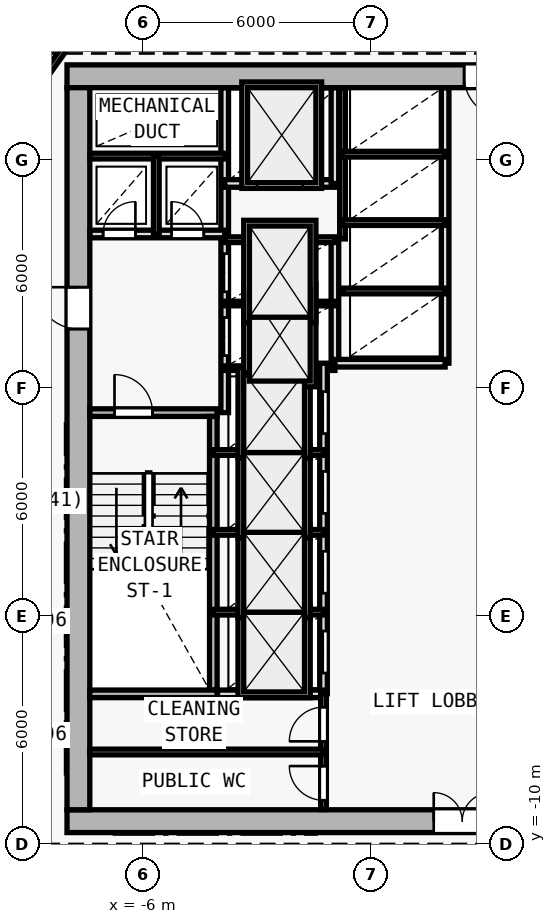
"""IFC4 building model, lengths in metres.
Left out: names, types, materials, properties, quantities, classifications, styles, units other than length and angle.
Written with IfcOpenShell. Run it as: python <this file> out.ifc"""

import sys

from ifc_helpers import new_model, si_unit, direction, frame, frame_2d, origin, origin_2d, place, context, subcontext, project, spatial, rectangle, i_section, extrude, element, fill, save


model = new_model("IFC4")
c1 = context("Model", 3, precision=1e-05, world=origin(), true_north=direction((0.0, 1.0)))
c2 = subcontext(c1, "Body", "Model", "MODEL_VIEW")
j1 = project(units=[si_unit("LENGTHUNIT", "METRE"), si_unit("PLANEANGLEUNIT", "RADIAN")], contexts=[c1])
p1 = place(None, origin())
s1 = spatial("IfcSite", under=j1, at=p1, CompositionType="ELEMENT")
p2 = place(p1, origin())
s2 = spatial("IfcBuilding", under=s1, at=p2, CompositionType="ELEMENT")
p3 = place(p2, frame((0.0, 0.0, 86.1)))
s3 = spatial("IfcBuildingStorey", under=s2, at=p3, CompositionType="ELEMENT", Elevation=86.1)
for number, where, z_axis, x_axis in (
    (1, (-7.7, -9.4, 0.0), (0.0, 0.0, 1.0), (1.0, 0.0, 0.0)),
    (2, (-7.7, 10.2, 0.0), (0.0, 0.0, 1.0), (1.0, 0.0, 0.0)),
    (3, (0.0, -9.4, 0.0), (0.0, 0.0, 1.0), (1.0, 0.0, 0.0)),
    (4, (-7.7, 2.0, 0.0), (0.0, 0.0, 1.0), (1.0, 0.0, 0.0)),
):
    element("IfcColumn", number, at=place(p3, frame(where, z_axis=z_axis, x_axis=x_axis)), inside=s3, PredefinedType="COLUMN", context=c2, shape_type="SweptSolid", body=[
        extrude(i_section(OverallWidth=0.409, OverallDepth=0.425, WebThickness=0.021, FlangeThickness=0.034, FilletRadius=0.015, at=origin_2d()), origin(), (0.0, 0.0, 1.0), 3.6),
    ])
p4 = place(p3, frame((-8.0, -9.4, 0.0), z_axis=(0.0, 0.0, 1.0), x_axis=(1.0, 0.0, 0.0)))
e5 = element("IfcWall", 5, at=p4, inside=s3, PredefinedType="SHEAR", context=c2, shape_type="SweptSolid", body=[
    extrude(rectangle(XDim=16.0, YDim=0.6, at=frame_2d((8.0, 0.0))), origin(), (0.0, 0.0, 1.0), 3.35),
])
p5 = place(p4, frame((9.65, 0.0, 0.0)))
e6 = element("IfcOpeningElement", 6, at=p5, cuts=e5, PredefinedType="OPENING", context=c2, shape_type="SweptSolid", body=[
    extrude(rectangle(XDim=1.5, YDim=2.2, at=frame_2d((0.75, 1.1))), frame((0.0, 0.31, 0.0), z_axis=(0.0, -1.0, 0.0), x_axis=(1.0, 0.0, 0.0)), (0.0, 0.0, 1.0), 0.62),
])
p6 = place(p3, frame((8.0, 10.2, 0.0), z_axis=(0.0, 0.0, 1.0), x_axis=(-1.0, 0.0, 0.0)))
e7 = element("IfcWall", 7, at=p6, inside=s3, PredefinedType="SHEAR", context=c2, shape_type="SweptSolid", body=[
    extrude(rectangle(XDim=16.0, YDim=0.6, at=frame_2d((8.0, 0.0))), origin(), (0.0, 0.0, 1.0), 3.35),
])
p7 = place(p6, frame((4.45, 0.0, 0.0)))
e8 = element("IfcOpeningElement", 8, at=p7, cuts=e7, PredefinedType="OPENING", context=c2, shape_type="SweptSolid", body=[
    extrude(rectangle(XDim=1.1, YDim=2.15, at=frame_2d((0.55, 1.075))), frame((0.0, 0.31, 0.0), z_axis=(0.0, -1.0, 0.0), x_axis=(1.0, 0.0, 0.0)), (0.0, 0.0, 1.0), 0.62),
])
p8 = place(p3, frame((-7.7, -9.1, 0.0), z_axis=(0.0, 0.0, 1.0), x_axis=(0.0, 1.0, 0.0)))
e9 = element("IfcWall", 9, at=p8, inside=s3, PredefinedType="SHEAR", context=c2, shape_type="SweptSolid", body=[
    extrude(rectangle(XDim=19.0, YDim=0.6, at=frame_2d((9.5, 0.0))), origin(), (0.0, 0.0, 1.0), 3.35),
])
p9 = place(p8, frame((12.65, 0.0, 0.0)))
e10 = element("IfcOpeningElement", 10, at=p9, cuts=e9, PredefinedType="OPENING", context=c2, shape_type="SweptSolid", body=[
    extrude(rectangle(XDim=1.1, YDim=2.15, at=frame_2d((0.55, 1.075))), frame((0.0, 0.31, 0.0), z_axis=(0.0, -1.0, 0.0), x_axis=(1.0, 0.0, 0.0)), (0.0, 0.0, 1.0), 0.62),
])
p10 = place(p3, frame((-7.4, 1.35, 0.0), z_axis=(0.0, 0.0, 1.0), x_axis=(1.0, 0.0, 0.0)))
e11 = element("IfcWall", 11, at=p10, inside=s3, PredefinedType="SOLIDWALL", context=c2, shape_type="SweptSolid", body=[
    extrude(rectangle(XDim=3.35, YDim=0.2, at=frame_2d((1.675, 0.0))), origin(), (0.0, 0.0, 1.0), 3.35),
])
p11 = place(p10, frame((0.65, 0.0, 0.0)))
e12 = element("IfcOpeningElement", 12, at=p11, cuts=e11, PredefinedType="OPENING", context=c2, shape_type="SweptSolid", body=[
    extrude(rectangle(XDim=1.0, YDim=2.15, at=frame_2d((0.5, 1.075))), frame((0.0, 0.11, 0.0), z_axis=(0.0, -1.0, 0.0), x_axis=(1.0, 0.0, 0.0)), (0.0, 0.0, 1.0), 0.22),
])
p12 = place(p3, frame((-4.15, -5.95, 0.0), z_axis=(0.0, 0.0, 1.0), x_axis=(0.0, 1.0, 0.0)))
e13 = element("IfcWall", 13, at=p12, inside=s3, PredefinedType="SOLIDWALL", context=c2, shape_type="SweptSolid", body=[
    extrude(rectangle(XDim=7.2, YDim=0.2, at=frame_2d((3.6, 0.0))), origin(), (0.0, 0.0, 1.0), 3.35),
])
p13 = place(p3, frame((-3.85, 1.35, 0.0), z_axis=(0.0, 0.0, 1.0), x_axis=(0.0, 1.0, 0.0)))
e14 = element("IfcWall", 14, at=p13, inside=s3, PredefinedType="SOLIDWALL", context=c2, shape_type="SweptSolid", body=[
    extrude(rectangle(XDim=8.545, YDim=0.2, at=frame_2d((4.272, 0.0))), origin(), (0.0, 0.0, 1.0), 3.35),
])
p14 = place(p13, frame((1.5, 0.0, 0.0)))
e15 = element("IfcOpeningElement", 15, at=p14, cuts=e14, PredefinedType="OPENING", context=c2, shape_type="SweptSolid", body=[
    extrude(rectangle(XDim=1.0, YDim=2.15, at=frame_2d((0.5, 1.075))), frame((0.0, 0.11, 0.0), z_axis=(0.0, -1.0, 0.0), x_axis=(1.0, 0.0, 0.0)), (0.0, 0.0, 1.0), 0.22),
])
p15 = place(p13, frame((3.18, 0.0, 0.0)))
e16 = element("IfcOpeningElement", 16, at=p15, cuts=e14, PredefinedType="OPENING", context=c2, shape_type="SweptSolid", body=[
    extrude(rectangle(XDim=1.0, YDim=2.15, at=frame_2d((0.5, 1.075))), frame((0.0, 0.11, 0.0), z_axis=(0.0, -1.0, 0.0), x_axis=(1.0, 0.0, 0.0)), (0.0, 0.0, 1.0), 0.22),
])
p16 = place(p3, frame((-7.395, 6.05, 0.0), z_axis=(0.0, 0.0, 1.0), x_axis=(1.0, 0.0, 0.0)))
e17 = element("IfcWall", 17, at=p16, inside=s3, PredefinedType="SOLIDWALL", context=c2, shape_type="SweptSolid", body=[
    extrude(rectangle(XDim=3.545, YDim=0.2, at=frame_2d((1.772, 0.0))), origin(), (0.0, 0.0, 1.0), 3.35),
])
p17 = place(p16, frame((0.345, 0.0, 0.0)))
e18 = element("IfcOpeningElement", 18, at=p17, cuts=e17, PredefinedType="OPENING", context=c2, shape_type="SweptSolid", body=[
    extrude(rectangle(XDim=0.85, YDim=2.1, at=frame_2d((0.425, 1.05))), frame((0.0, 0.11, 0.0), z_axis=(0.0, -1.0, 0.0), x_axis=(1.0, 0.0, 0.0)), (0.0, 0.0, 1.0), 0.22),
])
p18 = place(p16, frame((2.145, 0.0, 0.0)))
e19 = element("IfcOpeningElement", 19, at=p18, cuts=e17, PredefinedType="OPENING", context=c2, shape_type="SweptSolid", body=[
    extrude(rectangle(XDim=0.85, YDim=2.1, at=frame_2d((0.425, 1.05))), frame((0.0, 0.11, 0.0), z_axis=(0.0, -1.0, 0.0), x_axis=(1.0, 0.0, 0.0)), (0.0, 0.0, 1.0), 0.22),
])
p19 = place(p3, frame((-7.395, 8.1, 0.0), z_axis=(0.0, 0.0, 1.0), x_axis=(1.0, 0.0, 0.0)))
e20 = element("IfcWall", 20, at=p19, inside=s3, PredefinedType="PARTITIONING", context=c2, shape_type="SweptSolid", body=[
    extrude(rectangle(XDim=3.545, YDim=0.15, at=frame_2d((1.772, 0.0))), origin(), (0.0, 0.0, 1.0), 3.35),
])
p20 = place(p3, frame((-5.65, 6.05, 0.0), z_axis=(0.0, 0.0, 1.0), x_axis=(0.0, 1.0, 0.0)))
e21 = element("IfcWall", 21, at=p20, inside=s3, PredefinedType="PARTITIONING", context=c2, shape_type="SweptSolid", body=[
    extrude(rectangle(XDim=2.05, YDim=0.15, at=frame_2d((1.025, 0.0))), origin(), (0.0, 0.0, 1.0), 3.35),
])
p21 = place(p3, frame((-0.95, 2.65, 0.0), z_axis=(0.0, 0.0, 1.0), x_axis=(0.0, 1.0, 0.0)))
e22 = element("IfcWall", 22, at=p21, inside=s3, PredefinedType="SOLIDWALL", context=c2, shape_type="SweptSolid", body=[
    extrude(rectangle(XDim=3.27, YDim=0.2, at=frame_2d((1.635, 0.0))), origin(), (0.0, 0.0, 1.0), 3.35),
])
for number, where, z_axis, x_axis in (
    (23, (-3.85, 2.52, 0.0), (0.0, 0.0, 1.0), (1.0, 0.0, 0.0)),
    (24, (-3.85, 4.22, 0.0), (0.0, 0.0, 1.0), (1.0, 0.0, 0.0)),
):
    element("IfcWall", number, at=place(p3, frame(where, z_axis=z_axis, x_axis=x_axis)), inside=s3, PredefinedType="PARTITIONING", context=c2, shape_type="SweptSolid", body=[
        extrude(rectangle(XDim=2.9, YDim=0.12, at=frame_2d((1.45, 0.0))), origin(), (0.0, 0.0, 1.0), 3.35),
    ])
p22 = place(p3, frame((-3.85, 5.9, 0.0), z_axis=(0.0, 0.0, 1.0), x_axis=(1.0, 0.0, 0.0)))
e25 = element("IfcWall", 25, at=p22, inside=s3, PredefinedType="PARTITIONING", context=c2, shape_type="SweptSolid", body=[
    extrude(rectangle(XDim=2.9, YDim=0.15, at=frame_2d((1.45, 0.0))), origin(), (0.0, 0.0, 1.0), 3.35),
])
p23 = place(p3, frame((-3.85, 7.38, 0.0), z_axis=(0.0, 0.0, 1.0), x_axis=(1.0, 0.0, 0.0)))
e26 = element("IfcWall", 26, at=p23, inside=s3, PredefinedType="SOLIDWALL", context=c2, shape_type="SweptSolid", body=[
    extrude(rectangle(XDim=2.9, YDim=0.2, at=frame_2d((1.45, 0.0))), origin(), (0.0, 0.0, 1.0), 3.35),
])
p24 = place(p23, frame((0.85, 0.0, 0.0)))
e27 = element("IfcOpeningElement", 27, at=p24, cuts=e26, PredefinedType="OPENING", context=c2, shape_type="SweptSolid", body=[
    extrude(rectangle(XDim=1.2, YDim=2.2, at=frame_2d((0.6, 1.1))), frame((0.0, 0.11, 0.0), z_axis=(0.0, -1.0, 0.0), x_axis=(1.0, 0.0, 0.0)), (0.0, 0.0, 1.0), 0.22),
])
p25 = place(p3, frame((-0.95, 7.38, 0.0), z_axis=(0.0, 0.0, 1.0), x_axis=(0.0, 1.0, 0.0)))
e28 = element("IfcWall", 28, at=p25, inside=s3, PredefinedType="SOLIDWALL", context=c2, shape_type="SweptSolid", body=[
    extrude(rectangle(XDim=2.515, YDim=0.2, at=frame_2d((1.258, 0.0))), origin(), (0.0, 0.0, 1.0), 3.35),
])
p26 = place(p3, frame((-1.25, -6.05, 0.0), z_axis=(0.0, 0.0, 1.0), x_axis=(0.0, 1.0, 0.0)))
e29 = element("IfcWall", 29, at=p26, inside=s3, PredefinedType="SOLIDWALL", context=c2, shape_type="SweptSolid", body=[
    extrude(rectangle(XDim=8.7, YDim=0.2, at=frame_2d((4.35, 0.0))), origin(), (0.0, 0.0, 1.0), 3.35),
])
p27 = place(p26, frame((0.55, 0.0, 0.0)))
e30 = element("IfcOpeningElement", 30, at=p27, cuts=e29, PredefinedType="OPENING", context=c2, shape_type="SweptSolid", body=[
    extrude(rectangle(XDim=1.1, YDim=2.15, at=frame_2d((0.55, 1.075))), frame((0.0, 0.11, 0.0), z_axis=(0.0, -1.0, 0.0), x_axis=(1.0, 0.0, 0.0)), (0.0, 0.0, 1.0), 0.22),
])
p28 = place(p26, frame((2.65, 0.0, 0.0)))
e31 = element("IfcOpeningElement", 31, at=p28, cuts=e29, PredefinedType="OPENING", context=c2, shape_type="SweptSolid", body=[
    extrude(rectangle(XDim=1.1, YDim=2.15, at=frame_2d((0.55, 1.075))), frame((0.0, 0.11, 0.0), z_axis=(0.0, -1.0, 0.0), x_axis=(1.0, 0.0, 0.0)), (0.0, 0.0, 1.0), 0.22),
])
p29 = place(p26, frame((4.75, 0.0, 0.0)))
e32 = element("IfcOpeningElement", 32, at=p29, cuts=e29, PredefinedType="OPENING", context=c2, shape_type="SweptSolid", body=[
    extrude(rectangle(XDim=1.1, YDim=2.15, at=frame_2d((0.55, 1.075))), frame((0.0, 0.11, 0.0), z_axis=(0.0, -1.0, 0.0), x_axis=(1.0, 0.0, 0.0)), (0.0, 0.0, 1.0), 0.22),
])
p30 = place(p26, frame((6.85, 0.0, 0.0)))
e33 = element("IfcOpeningElement", 33, at=p30, cuts=e29, PredefinedType="OPENING", context=c2, shape_type="SweptSolid", body=[
    extrude(rectangle(XDim=1.1, YDim=2.15, at=frame_2d((0.55, 1.075))), frame((0.0, 0.11, 0.0), z_axis=(0.0, -1.0, 0.0), x_axis=(1.0, 0.0, 0.0)), (0.0, 0.0, 1.0), 0.22),
])
for number, where, z_axis, x_axis in (
    (34, (-4.15, -3.9, 0.0), (0.0, 0.0, 1.0), (1.0, 0.0, 0.0)),
    (35, (-4.15, -1.8, 0.0), (0.0, 0.0, 1.0), (1.0, 0.0, 0.0)),
    (36, (-4.15, 0.3, 0.0), (0.0, 0.0, 1.0), (1.0, 0.0, 0.0)),
):
    element("IfcWall", number, at=place(p3, frame(where, z_axis=z_axis, x_axis=x_axis)), inside=s3, PredefinedType="PARTITIONING", context=c2, shape_type="SweptSolid", body=[
        extrude(rectangle(XDim=2.9, YDim=0.15, at=frame_2d((1.45, 0.0))), origin(), (0.0, 0.0, 1.0), 3.35),
    ])
p31 = place(p3, frame((1.95, 2.65, 0.0), z_axis=(0.0, 0.0, 1.0), x_axis=(0.0, 1.0, 0.0)))
e37 = element("IfcWall", 37, at=p31, inside=s3, PredefinedType="SOLIDWALL", context=c2, shape_type="SweptSolid", body=[
    extrude(rectangle(XDim=7.245, YDim=0.2, at=frame_2d((3.623, 0.0))), origin(), (0.0, 0.0, 1.0), 3.35),
])
p32 = place(p3, frame((-0.95, 2.65, 0.0), z_axis=(0.0, 0.0, 1.0), x_axis=(1.0, 0.0, 0.0)))
e38 = element("IfcWall", 38, at=p32, inside=s3, PredefinedType="SOLIDWALL", context=c2, shape_type="SweptSolid", body=[
    extrude(rectangle(XDim=2.9, YDim=0.2, at=frame_2d((1.45, 0.0))), origin(), (0.0, 0.0, 1.0), 3.35),
])
p33 = place(p3, frame((-0.75, 5.92, 0.0), z_axis=(0.0, 0.0, 1.0), x_axis=(0.0, 1.0, 0.0)))
e39 = element("IfcWall", 39, at=p33, inside=s3, PredefinedType="PARTITIONING", context=c2, shape_type="SweptSolid", body=[
    extrude(rectangle(XDim=3.975, YDim=0.15, at=frame_2d((1.988, 0.0))), origin(), (0.0, 0.0, 1.0), 3.35),
])
for number, where, z_axis, x_axis in (
    (40, (-0.75, 4.55, 0.0), (0.0, 0.0, 1.0), (1.0, 0.0, 0.0)),
    (41, (-0.75, 6.35, 0.0), (0.0, 0.0, 1.0), (1.0, 0.0, 0.0)),
    (42, (-0.75, 8.15, 0.0), (0.0, 0.0, 1.0), (1.0, 0.0, 0.0)),
):
    element("IfcWall", number, at=place(p3, frame(where, z_axis=z_axis, x_axis=x_axis)), inside=s3, PredefinedType="PARTITIONING", context=c2, shape_type="SweptSolid", body=[
        extrude(rectangle(XDim=2.7, YDim=0.15, at=frame_2d((1.35, 0.0))), origin(), (0.0, 0.0, 1.0), 3.35),
    ])
p34 = place(p3, frame((-7.4, -6.05, 0.0), z_axis=(0.0, 0.0, 1.0), x_axis=(1.0, 0.0, 0.0)))
e43 = element("IfcWall", 43, at=p34, inside=s3, PredefinedType="SOLIDWALL", context=c2, shape_type="SweptSolid", body=[
    extrude(rectangle(XDim=3.35, YDim=0.2, at=frame_2d((1.675, 0.0))), origin(), (0.0, 0.0, 1.0), 3.35),
])
p35 = place(p3, frame((-4.04, -6.05, 0.0), z_axis=(0.0, 0.0, 1.0), x_axis=(1.0, 0.0, 0.0)))
e44 = element("IfcWall", 44, at=p35, inside=s3, PredefinedType="SOLIDWALL", context=c2, shape_type="SweptSolid", body=[
    extrude(rectangle(XDim=2.79, YDim=0.2, at=frame_2d((1.395, 0.0))), origin(), (0.0, 0.0, 1.0), 3.35),
])
p36 = place(p3, frame((-1.25, -9.095, 0.0), z_axis=(0.0, 0.0, 1.0), x_axis=(0.0, 1.0, 0.0)))
e45 = element("IfcWall", 45, at=p36, inside=s3, PredefinedType="PARTITIONING", context=c2, shape_type="SweptSolid", body=[
    extrude(rectangle(XDim=3.045, YDim=0.15, at=frame_2d((1.522, 0.0))), origin(), (0.0, 0.0, 1.0), 3.35),
])
p37 = place(p36, frame((1.795, 0.0, 0.0)))
e46 = element("IfcOpeningElement", 46, at=p37, cuts=e45, PredefinedType="OPENING", context=c2, shape_type="SweptSolid", body=[
    extrude(rectangle(XDim=0.9, YDim=2.1, at=frame_2d((0.45, 1.05))), frame((0.0, 0.085, 0.0), z_axis=(0.0, -1.0, 0.0), x_axis=(1.0, 0.0, 0.0)), (0.0, 0.0, 1.0), 0.17),
])
p38 = place(p36, frame((0.245, 0.0, 0.0)))
e47 = element("IfcOpeningElement", 47, at=p38, cuts=e45, PredefinedType="OPENING", context=c2, shape_type="SweptSolid", body=[
    extrude(rectangle(XDim=0.9, YDim=2.1, at=frame_2d((0.45, 1.05))), frame((0.0, 0.085, 0.0), z_axis=(0.0, -1.0, 0.0), x_axis=(1.0, 0.0, 0.0)), (0.0, 0.0, 1.0), 0.17),
])
p39 = place(p3, frame((-7.395, -7.58, 0.0), z_axis=(0.0, 0.0, 1.0), x_axis=(1.0, 0.0, 0.0)))
e48 = element("IfcWall", 48, at=p39, inside=s3, PredefinedType="PARTITIONING", context=c2, shape_type="SweptSolid", body=[
    extrude(rectangle(XDim=6.145, YDim=0.15, at=frame_2d((3.073, 0.0))), origin(), (0.0, 0.0, 1.0), 3.35),
])
p40 = place(p3, frame((-9.86, 8.426, 0.0), z_axis=(0.0, 0.0, 1.0), x_axis=(0.582449511476, 0.812866881218, 0.0)))
e49 = element("IfcWall", 49, at=p40, inside=s3, PredefinedType="PARTITIONING", context=c2, shape_type="SweptSolid", body=[
    extrude(rectangle(XDim=4.84, YDim=0.15, at=frame_2d((2.42, 0.0))), origin(), (0.0, 0.0, 1.0), 2.725),
])
p41 = place(p5, origin())
e50 = element("IfcDoor", 50, at=p41, inside=s3, OperationType="DOUBLE_DOOR_SINGLE_SWING", PredefinedType="DOOR", context=c2, shape_type="SweptSolid", body=[
    extrude(rectangle(XDim=1.5, YDim=2.2, at=frame_2d((0.75, 1.1))), frame((0.0, 0.025, 0.0), z_axis=(0.0, -1.0, 0.0), x_axis=(1.0, 0.0, 0.0)), (0.0, 0.0, 1.0), 0.05),
])
fill(e6, e50)
p42 = place(p9, origin())
e51 = element("IfcDoor", 51, at=p42, inside=s3, OperationType="SINGLE_SWING_RIGHT", PredefinedType="DOOR", context=c2, shape_type="SweptSolid", body=[
    extrude(rectangle(XDim=1.1, YDim=2.15, at=frame_2d((0.55, 1.075))), frame((0.0, 0.025, 0.0), z_axis=(0.0, -1.0, 0.0), x_axis=(1.0, 0.0, 0.0)), (0.0, 0.0, 1.0), 0.05),
])
fill(e10, e51)
p43 = place(p7, origin())
e52 = element("IfcDoor", 52, at=p43, inside=s3, OperationType="SINGLE_SWING_LEFT", PredefinedType="DOOR", context=c2, shape_type="SweptSolid", body=[
    extrude(rectangle(XDim=1.1, YDim=2.15, at=frame_2d((0.55, 1.075))), frame((0.0, 0.025, 0.0), z_axis=(0.0, -1.0, 0.0), x_axis=(1.0, 0.0, 0.0)), (0.0, 0.0, 1.0), 0.05),
])
fill(e8, e52)
p44 = place(p11, origin())
e53 = element("IfcDoor", 53, at=p44, inside=s3, OperationType="SINGLE_SWING_LEFT", PredefinedType="DOOR", context=c2, shape_type="SweptSolid", body=[
    extrude(rectangle(XDim=1.0, YDim=2.15, at=frame_2d((0.5, 1.075))), frame((0.0, 0.025, 0.0), z_axis=(0.0, -1.0, 0.0), x_axis=(1.0, 0.0, 0.0)), (0.0, 0.0, 1.0), 0.05),
])
fill(e12, e53)
p45 = place(p17, origin())
e54 = element("IfcDoor", 54, at=p45, inside=s3, OperationType="SINGLE_SWING_RIGHT", PredefinedType="DOOR", context=c2, shape_type="SweptSolid", body=[
    extrude(rectangle(XDim=0.85, YDim=2.1, at=frame_2d((0.425, 1.05))), frame((0.0, 0.025, 0.0), z_axis=(0.0, -1.0, 0.0), x_axis=(1.0, 0.0, 0.0)), (0.0, 0.0, 1.0), 0.05),
])
fill(e18, e54)
p46 = place(p18, origin())
e55 = element("IfcDoor", 55, at=p46, inside=s3, OperationType="SINGLE_SWING_LEFT", PredefinedType="DOOR", context=c2, shape_type="SweptSolid", body=[
    extrude(rectangle(XDim=0.85, YDim=2.1, at=frame_2d((0.425, 1.05))), frame((0.0, 0.025, 0.0), z_axis=(0.0, -1.0, 0.0), x_axis=(1.0, 0.0, 0.0)), (0.0, 0.0, 1.0), 0.05),
])
fill(e19, e55)
p47 = place(p24, origin())
e56 = element("IfcDoor", 56, at=p47, inside=s3, OperationType="DOUBLE_DOOR_SLIDING", PredefinedType="DOOR", context=c2, shape_type="SweptSolid", body=[
    extrude(rectangle(XDim=1.2, YDim=2.2, at=frame_2d((0.6, 1.1))), frame((0.0, 0.025, 0.0), z_axis=(0.0, -1.0, 0.0), x_axis=(1.0, 0.0, 0.0)), (0.0, 0.0, 1.0), 0.05),
])
fill(e27, e56)
p48 = place(p27, origin())
e57 = element("IfcDoor", 57, at=p48, inside=s3, OperationType="DOUBLE_DOOR_SLIDING", PredefinedType="DOOR", context=c2, shape_type="SweptSolid", body=[
    extrude(rectangle(XDim=1.1, YDim=2.15, at=frame_2d((0.55, 1.075))), frame((0.0, 0.025, 0.0), z_axis=(0.0, -1.0, 0.0), x_axis=(1.0, 0.0, 0.0)), (0.0, 0.0, 1.0), 0.05),
])
fill(e30, e57)
p49 = place(p28, origin())
e58 = element("IfcDoor", 58, at=p49, inside=s3, OperationType="DOUBLE_DOOR_SLIDING", PredefinedType="DOOR", context=c2, shape_type="SweptSolid", body=[
    extrude(rectangle(XDim=1.1, YDim=2.15, at=frame_2d((0.55, 1.075))), frame((0.0, 0.025, 0.0), z_axis=(0.0, -1.0, 0.0), x_axis=(1.0, 0.0, 0.0)), (0.0, 0.0, 1.0), 0.05),
])
fill(e31, e58)
p50 = place(p29, origin())
e59 = element("IfcDoor", 59, at=p50, inside=s3, OperationType="DOUBLE_DOOR_SLIDING", PredefinedType="DOOR", context=c2, shape_type="SweptSolid", body=[
    extrude(rectangle(XDim=1.1, YDim=2.15, at=frame_2d((0.55, 1.075))), frame((0.0, 0.025, 0.0), z_axis=(0.0, -1.0, 0.0), x_axis=(1.0, 0.0, 0.0)), (0.0, 0.0, 1.0), 0.05),
])
fill(e32, e59)
p51 = place(p30, origin())
e60 = element("IfcDoor", 60, at=p51, inside=s3, OperationType="DOUBLE_DOOR_SLIDING", PredefinedType="DOOR", context=c2, shape_type="SweptSolid", body=[
    extrude(rectangle(XDim=1.1, YDim=2.15, at=frame_2d((0.55, 1.075))), frame((0.0, 0.025, 0.0), z_axis=(0.0, -1.0, 0.0), x_axis=(1.0, 0.0, 0.0)), (0.0, 0.0, 1.0), 0.05),
])
fill(e33, e60)
p52 = place(p14, origin())
e61 = element("IfcDoor", 61, at=p52, inside=s3, OperationType="DOUBLE_DOOR_SLIDING", PredefinedType="DOOR", context=c2, shape_type="SweptSolid", body=[
    extrude(rectangle(XDim=1.0, YDim=2.15, at=frame_2d((0.5, 1.075))), frame((0.0, 0.025, 0.0), z_axis=(0.0, -1.0, 0.0), x_axis=(1.0, 0.0, 0.0)), (0.0, 0.0, 1.0), 0.05),
])
fill(e15, e61)
p53 = place(p15, origin())
e62 = element("IfcDoor", 62, at=p53, inside=s3, OperationType="DOUBLE_DOOR_SLIDING", PredefinedType="DOOR", context=c2, shape_type="SweptSolid", body=[
    extrude(rectangle(XDim=1.0, YDim=2.15, at=frame_2d((0.5, 1.075))), frame((0.0, 0.025, 0.0), z_axis=(0.0, -1.0, 0.0), x_axis=(1.0, 0.0, 0.0)), (0.0, 0.0, 1.0), 0.05),
])
fill(e16, e62)
p54 = place(p37, origin())
e63 = element("IfcDoor", 63, at=p54, inside=s3, OperationType="SINGLE_SWING_LEFT", PredefinedType="DOOR", context=c2, shape_type="SweptSolid", body=[
    extrude(rectangle(XDim=0.9, YDim=2.1, at=frame_2d((0.45, 1.05))), frame((0.0, 0.025, 0.0), z_axis=(0.0, -1.0, 0.0), x_axis=(1.0, 0.0, 0.0)), (0.0, 0.0, 1.0), 0.05),
])
fill(e46, e63)
p55 = place(p38, origin())
e64 = element("IfcDoor", 64, at=p55, inside=s3, OperationType="SINGLE_SWING_RIGHT", PredefinedType="DOOR", context=c2, shape_type="SweptSolid", body=[
    extrude(rectangle(XDim=0.9, YDim=2.1, at=frame_2d((0.45, 1.05))), frame((0.0, 0.025, 0.0), z_axis=(0.0, -1.0, 0.0), x_axis=(1.0, 0.0, 0.0)), (0.0, 0.0, 1.0), 0.05),
])
fill(e47, e64)
save(model, sys.argv[1])
